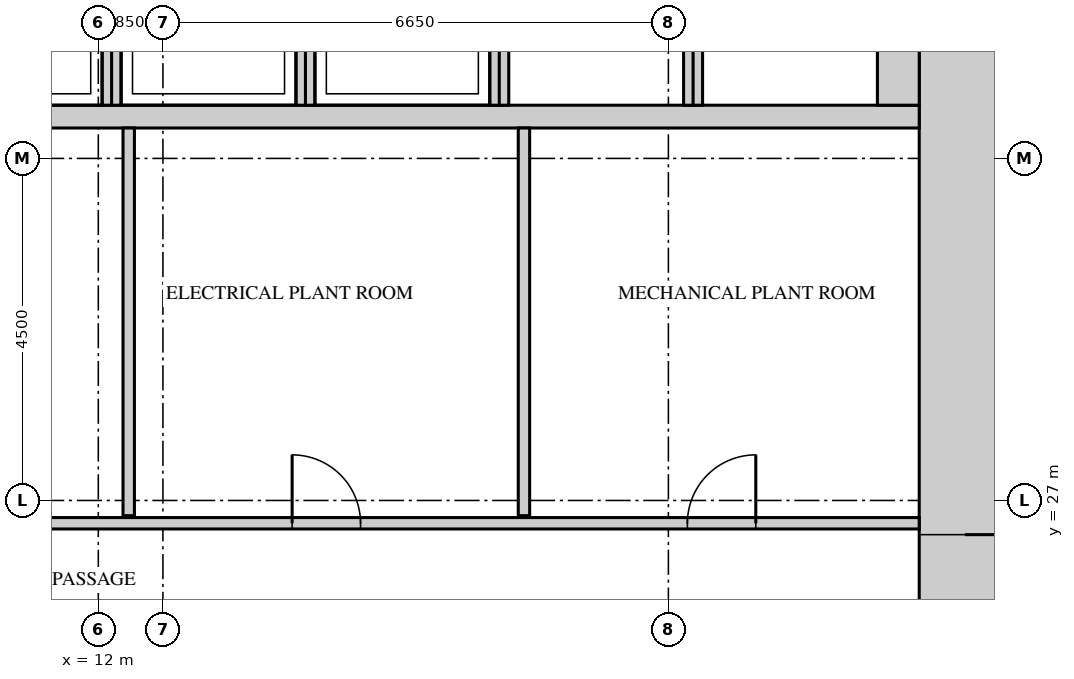
"""IFC4 building model, lengths in metres.
Left out: names, types, materials, properties, quantities, classifications, styles, units other than length and angle.
Written with IfcOpenShell. Run it as: python <this file> out.ifc"""

import sys

from ifc_helpers import new_model, si_unit, direction, frame, frame_2d, origin, place, context, subcontext, project, spatial, rectangle, extrude, source, transform, mapped, element, fill, save


model = new_model("IFC4")
c1 = context("Model", 3, precision=1e-05, world=origin(), true_north=direction((0.0, 1.0)))
c2 = subcontext(c1, "Body", "Model", "MODEL_VIEW")
j1 = project(units=[si_unit("LENGTHUNIT", "METRE"), si_unit("PLANEANGLEUNIT", "RADIAN")], contexts=[c1])
p1 = place(None, origin())
s1 = spatial("IfcSite", under=j1, at=p1, CompositionType="ELEMENT")
p2 = place(p1, origin())
s2 = spatial("IfcBuilding", under=s1, at=p2, CompositionType="ELEMENT")
p3 = place(p2, frame((0.0, 0.0, 96.0)))
s3 = spatial("IfcBuildingStorey", under=s2, at=p3, CompositionType="ELEMENT", Elevation=96.0)
m1 = source(origin(), c2, "Body", "SweptSolid", [
    extrude(rectangle(XDim=27.6, YDim=1.2, at=frame_2d((13.8, 0.0))), origin(), (0.0, 0.0, 1.0), 5.2),
])
p4 = place(p3, frame((23.4, 13.2, 0.0), z_axis=(0.0, 0.0, 1.0), x_axis=(0.0, 1.0, 0.0)))
e1 = element("IfcWall", 1, at=p4, inside=s3, PredefinedType="SHEAR", context=c2, shape_type="MappedRepresentation", body=[
    mapped(m1, transform((0.0, 0.0, 0.0))),
])
m2 = source(origin(), c2, "Body", "SweptSolid", [
    extrude(rectangle(XDim=1.8, YDim=2.1, at=frame_2d((0.9, 1.05))), frame((0.0, 0.61, 0.0), z_axis=(0.0, -1.0, 0.0), x_axis=(1.0, 0.0, 0.0)), (0.0, 0.0, 1.0), 1.22),
])
p5 = place(p4, frame((22.4, 0.0, 0.0)))
e2 = element("IfcOpeningElement", 2, at=p5, cuts=e1, PredefinedType="OPENING", context=c2, shape_type="MappedRepresentation", body=[
    mapped(m2, transform((0.0, 0.0, 0.0))),
])
m3 = source(origin(), c2, "Body", "SweptSolid", [
    extrude(rectangle(XDim=1.2, YDim=2.1, at=frame_2d((0.6, 1.05))), frame((0.0, 0.61, 0.0), z_axis=(0.0, -1.0, 0.0), x_axis=(1.0, 0.0, 0.0)), (0.0, 0.0, 1.0), 1.22),
])
p6 = place(p4, frame((12.15, 0.0, 0.0)))
e3 = element("IfcOpeningElement", 3, at=p6, cuts=e1, PredefinedType="OPENING", context=c2, shape_type="MappedRepresentation", body=[
    mapped(m3, transform((0.0, 0.0, 0.0))),
])
m4 = source(origin(), c2, "Body", "SweptSolid", [
    extrude(rectangle(XDim=0.9, YDim=2.1, at=frame_2d((0.45, 1.05))), frame((0.0, 0.61, 0.0), z_axis=(0.0, -1.0, 0.0), x_axis=(1.0, 0.0, 0.0)), (0.0, 0.0, 1.0), 1.22),
])
p7 = place(p4, frame((1.95, 0.0, 0.0)))
e4 = element("IfcOpeningElement", 4, at=p7, cuts=e1, PredefinedType="OPENING", context=c2, shape_type="MappedRepresentation", body=[
    mapped(m4, transform((0.0, 0.0, 0.0))),
])
p8 = place(p4, frame((6.8, 0.0, 0.0)))
e5 = element("IfcOpeningElement", 5, at=p8, cuts=e1, PredefinedType="OPENING", context=c2, shape_type="MappedRepresentation", body=[
    mapped(m4, transform((0.0, 0.0, 0.0))),
])
m5 = source(origin(), c2, "Body", "SweptSolid", [
    extrude(rectangle(XDim=15.6, YDim=0.3, at=frame_2d((7.8, 0.0))), origin(), (0.0, 0.0, 1.0), 5.2),
])
p9 = place(p3, frame((7.2, 32.05, 0.0), z_axis=(0.0, 0.0, 1.0), x_axis=(1.0, 0.0, 0.0)))
e6 = element("IfcWall", 6, at=p9, inside=s3, PredefinedType="STANDARD", context=c2, shape_type="MappedRepresentation", body=[
    mapped(m5, transform((0.0, 0.0, 0.0))),
])
m6 = source(origin(), c2, "Body", "SweptSolid", [
    extrude(rectangle(XDim=2.4, YDim=0.25, at=frame_2d((1.2, 0.0))), origin(), (0.0, 0.0, 1.0), 5.2),
])
for number, where, z_axis, x_axis in (
    (7, (12.175, 32.2, 0.0), (0.0, 0.0, 1.0), (0.0, 1.0, 0.0)),
    (8, (14.725, 32.2, 0.0), (0.0, 0.0, 1.0), (0.0, 1.0, 0.0)),
    (9, (17.275, 32.2, 0.0), (0.0, 0.0, 1.0), (0.0, 1.0, 0.0)),
    (10, (19.825, 32.2, 0.0), (0.0, 0.0, 1.0), (0.0, 1.0, 0.0)),
):
    element("IfcWall", number, at=place(p3, frame(where, z_axis=z_axis, x_axis=x_axis)), inside=s3, PredefinedType="STANDARD", context=c2, shape_type="MappedRepresentation", body=[
        mapped(m6, transform((0.0, 0.0, 0.0))),
    ])
m7 = source(origin(), c2, "Body", "SweptSolid", [
    extrude(rectangle(XDim=2.4, YDim=0.55, at=frame_2d((1.2, 0.0))), origin(), (0.0, 0.0, 1.0), 5.2),
])
p10 = place(p3, frame((22.525, 32.2, 0.0), z_axis=(0.0, 0.0, 1.0), x_axis=(0.0, 1.0, 0.0)))
e11 = element("IfcWall", 11, at=p10, inside=s3, PredefinedType="STANDARD", context=c2, shape_type="MappedRepresentation", body=[
    mapped(m7, transform((0.0, 0.0, 0.0))),
])
m8 = source(origin(), c2, "Body", "SweptSolid", [
    extrude(rectangle(XDim=15.6, YDim=0.15, at=frame_2d((7.8, 0.0))), origin(), (0.0, 0.0, 1.0), 5.2),
])
p11 = place(p3, frame((7.2, 26.7, 0.0), z_axis=(0.0, 0.0, 1.0), x_axis=(1.0, 0.0, 0.0)))
e12 = element("IfcWall", 12, at=p11, inside=s3, PredefinedType="PARTITIONING", context=c2, shape_type="MappedRepresentation", body=[
    mapped(m8, transform((0.0, 0.0, 0.0))),
])
m9 = source(origin(), c2, "Body", "SweptSolid", [
    extrude(rectangle(XDim=0.9, YDim=2.1, at=frame_2d((0.45, 1.05))), frame((0.0, 0.085, 0.0), z_axis=(0.0, -1.0, 0.0), x_axis=(1.0, 0.0, 0.0)), (0.0, 0.0, 1.0), 0.17),
])
p12 = place(p11, frame((2.15, 0.0, 0.0)))
e13 = element("IfcOpeningElement", 13, at=p12, cuts=e12, PredefinedType="OPENING", context=c2, shape_type="MappedRepresentation", body=[
    mapped(m9, transform((0.0, 0.0, 0.0))),
])
p13 = place(p11, frame((7.35, 0.0, 0.0)))
e14 = element("IfcOpeningElement", 14, at=p13, cuts=e12, PredefinedType="OPENING", context=c2, shape_type="MappedRepresentation", body=[
    mapped(m9, transform((0.0, 0.0, 0.0))),
])
p14 = place(p11, frame((12.55, 0.0, 0.0)))
e15 = element("IfcOpeningElement", 15, at=p14, cuts=e12, PredefinedType="OPENING", context=c2, shape_type="MappedRepresentation", body=[
    mapped(m9, transform((0.0, 0.0, 0.0))),
])
m10 = source(origin(), c2, "Body", "SweptSolid", [
    extrude(rectangle(XDim=5.1, YDim=0.15, at=frame_2d((2.55, 0.0))), origin(), (0.0, 0.0, 1.0), 5.2),
])
for number, where, z_axis, x_axis in (
    (16, (12.4, 26.8, 0.0), (0.0, 0.0, 1.0), (0.0, 1.0, 0.0)),
    (17, (17.6, 26.8, 0.0), (0.0, 0.0, 1.0), (0.0, 1.0, 0.0)),
):
    element("IfcWall", number, at=place(p3, frame(where, z_axis=z_axis, x_axis=x_axis)), inside=s3, PredefinedType="PARTITIONING", context=c2, shape_type="MappedRepresentation", body=[
        mapped(m10, transform((0.0, 0.0, 0.0))),
    ])
m11 = source(origin(), c2, "Body", "SweptSolid", [
    extrude(rectangle(XDim=1.2, YDim=2.1, at=frame_2d((0.6, 1.05))), frame((0.0, 0.55, 0.0), z_axis=(0.0, -1.0, 0.0), x_axis=(1.0, 0.0, 0.0)), (0.0, 0.0, 1.0), 1.1),
])
p15 = place(p6, origin())
e18 = element("IfcDoor", 18, at=p15, inside=s3, OperationType="SINGLE_SWING_RIGHT", PredefinedType="DOOR", context=c2, shape_type="MappedRepresentation", body=[
    mapped(m11, transform((0.0, 0.0, 0.0))),
])
fill(e3, e18)
m12 = source(origin(), c2, "Body", "SweptSolid", [
    extrude(rectangle(XDim=0.9, YDim=2.1, at=frame_2d((0.45, 1.05))), frame((0.0, 0.025, 0.0), z_axis=(0.0, -1.0, 0.0), x_axis=(1.0, 0.0, 0.0)), (0.0, 0.0, 1.0), 0.05),
])
p16 = place(p13, origin())
e19 = element("IfcDoor", 19, at=p16, inside=s3, OperationType="SINGLE_SWING_RIGHT", PredefinedType="DOOR", context=c2, shape_type="MappedRepresentation", body=[
    mapped(m12, transform((0.0, 0.0, 0.0))),
])
fill(e14, e19)
p17 = place(p14, origin())
e20 = element("IfcDoor", 20, at=p17, inside=s3, OperationType="SINGLE_SWING_LEFT", PredefinedType="DOOR", context=c2, shape_type="MappedRepresentation", body=[
    mapped(m12, transform((0.0, 0.0, 0.0))),
])
fill(e15, e20)
save(model, sys.argv[1])
